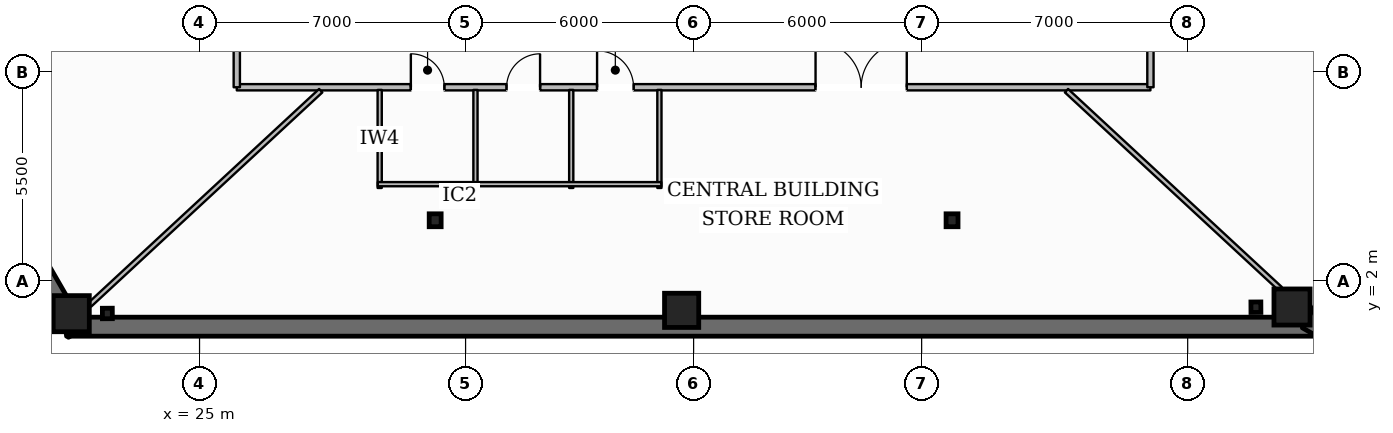
"""IFC4 building model, lengths in metres.
Left out: names, types, materials, properties, quantities, classifications, styles, units other than length and angle.
Written with IfcOpenShell. Run it as: python <this file> out.ifc"""

import sys

from ifc_helpers import new_model, si_unit, direction, frame, frame_2d, origin, origin_2d, place, context, subcontext, project, spatial, rectangle, hollow_rectangle, i_section, extrude, element, fill, save


model = new_model("IFC4")
c1 = context("Model", 3, precision=1e-05, world=origin(), true_north=direction((0.0, 1.0)))
c2 = subcontext(c1, "Body", "Model", "MODEL_VIEW")
j1 = project(units=[si_unit("LENGTHUNIT", "METRE"), si_unit("PLANEANGLEUNIT", "RADIAN")], contexts=[c1])
p1 = place(None, origin())
s1 = spatial("IfcSite", under=j1, at=p1, CompositionType="ELEMENT")
p2 = place(p1, origin())
s2 = spatial("IfcBuilding", under=s1, at=p2, CompositionType="ELEMENT")
p3 = place(p2, frame((0.0, 0.0, -4.2)))
s3 = spatial("IfcBuildingStorey", under=s2, at=p3, CompositionType="ELEMENT", Elevation=-4.2)
p4 = place(p3, frame((13.122, 15.618, 0.0), z_axis=(0.0, 0.0, 1.0), x_axis=(0.499998305863, -0.866026381893, 0.0)))
e1 = element("IfcWall", 1, at=p4, inside=s3, PredefinedType="SHEAR", context=c2, shape_type="SweptSolid", body=[
    extrude(rectangle(XDim=17.289, YDim=0.5, at=frame_2d((8.644, 0.0))), origin(), (0.0, 0.0, 1.0), 3.94),
])
p5 = place(p3, frame((21.5, 0.8, 0.0), z_axis=(0.0, 0.0, 1.0), x_axis=(1.0, 0.0, 0.0)))
e2 = element("IfcWall", 2, at=p5, inside=s3, PredefinedType="SHEAR", context=c2, shape_type="SweptSolid", body=[
    extrude(rectangle(XDim=33.0, YDim=0.5, at=frame_2d((16.5, 0.0))), origin(), (0.0, 0.0, 1.0), 3.94),
])
p6 = place(p3, frame((54.233, 0.646, 0.0), z_axis=(0.0, 0.0, 1.0), x_axis=(0.499998305863, 0.866026381893, 0.0)))
e3 = element("IfcWall", 3, at=p6, inside=s3, PredefinedType="SHEAR", context=c2, shape_type="SweptSolid", body=[
    extrude(rectangle(XDim=17.289, YDim=0.5, at=frame_2d((8.644, 0.0))), origin(), (0.0, 0.0, 1.0), 3.94),
])
for number, where, z_axis, x_axis in (
    (4, (21.625, 1.142, 0.0), (0.0, 0.0, 1.0), (1.0, 0.0, 0.0)),
    (5, (53.746, 1.318, 0.0), (0.0, 0.0, 1.0), (1.0, 0.0, 0.0)),
):
    element("IfcColumn", number, at=place(p3, frame(where, z_axis=z_axis, x_axis=x_axis)), inside=s3, PredefinedType="COLUMN", context=c2, shape_type="SweptSolid", body=[
        extrude(hollow_rectangle(XDim=0.95, YDim=0.95, WallThickness=0.04, at=origin_2d()), origin(), (0.0, 0.0, 1.0), 3.94),
    ])
p7 = place(p3, frame((37.685, 1.23, 0.0), z_axis=(0.0, 0.0, 1.0), x_axis=(1.0, 0.0, 0.0)))
e6 = element("IfcColumn", 6, at=p7, inside=s3, PredefinedType="COLUMN", context=c2, shape_type="SweptSolid", body=[
    extrude(hollow_rectangle(XDim=0.9, YDim=0.9, WallThickness=0.038, at=origin_2d()), origin(), (0.0, 0.0, 1.0), 3.94),
])
for number, where, z_axis, x_axis in (
    (7, (22.574, 1.148, 0.0), (0.0, 0.0, 1.0), (1.0, 0.005, 0.0)),
    (8, (52.795, 1.312, 0.0), (0.0, 0.0, 1.0), (1.0, 0.005, 0.0)),
):
    element("IfcColumn", number, at=place(p3, frame(where, z_axis=z_axis, x_axis=x_axis)), inside=s3, PredefinedType="PILASTER", context=c2, shape_type="SweptSolid", body=[
        extrude(i_section(OverallWidth=0.261, OverallDepth=0.276, WebThickness=0.015, FlangeThickness=0.025, at=origin_2d()), origin(), (0.0, 0.0, 1.0), 3.94),
    ])
for number, where, z_axis, x_axis in (
    (9, (31.2, 3.6, 0.0), (0.0, 0.0, 1.0), (1.0, 0.0, 0.0)),
    (10, (44.8, 3.6, 0.0), (0.0, 0.0, 1.0), (1.0, 0.0, 0.0)),
):
    element("IfcColumn", number, at=place(p3, frame(where, z_axis=z_axis, x_axis=x_axis)), inside=s3, PredefinedType="COLUMN", context=c2, shape_type="SweptSolid", body=[
        extrude(i_section(OverallWidth=0.314, OverallDepth=0.34, WebThickness=0.019, FlangeThickness=0.031, at=origin_2d()), origin(), (0.0, 0.0, 1.0), 3.94),
    ])
p8 = place(p3, frame((25.98, 7.1, 0.0), z_axis=(0.0, 0.0, 1.0), x_axis=(1.0, 0.0, 0.0)))
e11 = element("IfcWall", 11, at=p8, inside=s3, PredefinedType="PARTITIONING", context=c2, shape_type="SweptSolid", body=[
    extrude(rectangle(XDim=24.04, YDim=0.165, at=frame_2d((12.02, 0.0))), origin(), (0.0, 0.0, 1.0), 3.94),
])
p9 = place(p8, frame((4.58, 0.0, 0.0)))
e12 = element("IfcOpeningElement", 12, at=p9, cuts=e11, PredefinedType="OPENING", context=c2, shape_type="SweptSolid", body=[
    extrude(rectangle(XDim=0.88, YDim=2.1, at=frame_2d((0.44, 1.05))), frame((0.0, 0.093, 0.0), z_axis=(0.0, -1.0, 0.0), x_axis=(1.0, 0.0, 0.0)), (0.0, 0.0, 1.0), 0.185),
])
p10 = place(p8, frame((7.1, 0.0, 0.0)))
e13 = element("IfcOpeningElement", 13, at=p10, cuts=e11, PredefinedType="OPENING", context=c2, shape_type="SweptSolid", body=[
    extrude(rectangle(XDim=0.88, YDim=2.1, at=frame_2d((0.44, 1.05))), frame((0.0, 0.093, 0.0), z_axis=(0.0, -1.0, 0.0), x_axis=(1.0, 0.0, 0.0)), (0.0, 0.0, 1.0), 0.185),
])
p11 = place(p8, frame((9.48, 0.0, 0.0)))
e14 = element("IfcOpeningElement", 14, at=p11, cuts=e11, PredefinedType="OPENING", context=c2, shape_type="SweptSolid", body=[
    extrude(rectangle(XDim=0.96, YDim=2.1, at=frame_2d((0.48, 1.05))), frame((0.0, 0.093, 0.0), z_axis=(0.0, -1.0, 0.0), x_axis=(1.0, 0.0, 0.0)), (0.0, 0.0, 1.0), 0.185),
])
p12 = place(p8, frame((15.229, 0.0, 0.0)))
e15 = element("IfcOpeningElement", 15, at=p12, cuts=e11, PredefinedType="OPENING", context=c2, shape_type="SweptSolid", body=[
    extrude(rectangle(XDim=2.4, YDim=2.4, at=frame_2d((1.2, 1.2))), frame((0.0, 0.093, 0.0), z_axis=(0.0, -1.0, 0.0), x_axis=(1.0, 0.0, 0.0)), (0.0, 0.0, 1.0), 0.185),
])
p13 = place(p3, frame((25.98, 7.1, 0.0), z_axis=(0.0, 0.0, 1.0), x_axis=(0.0, 1.0, 0.0)))
e16 = element("IfcWall", 16, at=p13, inside=s3, PredefinedType="PARTITIONING", context=c2, shape_type="SweptSolid", body=[
    extrude(rectangle(XDim=18.0, YDim=0.165, at=frame_2d((9.0, 0.0))), origin(), (0.0, 0.0, 1.0), 3.94),
])
p14 = place(p13, frame((4.505, 0.0, 0.0)))
e17 = element("IfcOpeningElement", 17, at=p14, cuts=e16, PredefinedType="OPENING", context=c2, shape_type="SweptSolid", body=[
    extrude(rectangle(XDim=2.4, YDim=2.4, at=frame_2d((1.2, 1.2))), frame((0.0, 0.093, 0.0), z_axis=(0.0, -1.0, 0.0), x_axis=(1.0, 0.0, 0.0)), (0.0, 0.0, 1.0), 0.185),
])
p15 = place(p3, frame((50.02, 7.1, 0.0), z_axis=(0.0, 0.0, 1.0), x_axis=(0.0, 1.0, 0.0)))
e18 = element("IfcWall", 18, at=p15, inside=s3, PredefinedType="PARTITIONING", context=c2, shape_type="SweptSolid", body=[
    extrude(rectangle(XDim=18.0, YDim=0.165, at=frame_2d((9.0, 0.0))), origin(), (0.0, 0.0, 1.0), 3.628),
])
p16 = place(p15, frame((6.144, 0.0, 0.0)))
e19 = element("IfcOpeningElement", 19, at=p16, cuts=e18, PredefinedType="OPENING", context=c2, shape_type="SweptSolid", body=[
    extrude(rectangle(XDim=2.4, YDim=2.4, at=frame_2d((1.2, 1.2))), frame((0.0, 0.093, 0.0), z_axis=(0.0, -1.0, 0.0), x_axis=(1.0, 0.0, 0.0)), (0.0, 0.0, 1.0), 0.185),
])
for number, where, z_axis, x_axis in (
    (20, (29.74, 4.45, 0.0), (0.0, 0.0, 1.0), (0.0, 1.0, 0.0)),
    (21, (32.26, 4.45, 0.0), (0.0, 0.0, 1.0), (0.0, 1.0, 0.0)),
    (22, (34.78, 4.45, 0.0), (0.0, 0.0, 1.0), (0.0, 1.0, 0.0)),
    (23, (37.1, 4.45, 0.0), (0.0, 0.0, 1.0), (0.0, 1.0, 0.0)),
):
    element("IfcWall", number, at=place(p3, frame(where, z_axis=z_axis, x_axis=x_axis)), inside=s3, PredefinedType="PLUMBINGWALL", context=c2, shape_type="SweptSolid", body=[
        extrude(rectangle(XDim=2.58, YDim=0.11, at=frame_2d((1.29, 0.0))), origin(), (0.0, 0.0, 1.0), 3.94),
    ])
p17 = place(p3, frame((29.69, 4.55, 0.0), z_axis=(0.0, 0.0, 1.0), x_axis=(1.0, 0.0, 0.0)))
e24 = element("IfcWall", 24, at=p17, inside=s3, PredefinedType="PLUMBINGWALL", context=c2, shape_type="SweptSolid", body=[
    extrude(rectangle(XDim=7.46, YDim=0.11, at=frame_2d((3.73, 0.0))), origin(), (0.0, 0.0, 1.0), 3.628),
])
p18 = place(p3, frame((28.189, 7.01, 0.0), z_axis=(0.0, 0.0, 1.0), x_axis=(-0.733538790589, -0.679647587137, 0.0)))
e25 = element("IfcWall", 25, at=p18, inside=s3, PredefinedType="PARTITIONING", context=c2, shape_type="SweptSolid", body=[
    extrude(rectangle(XDim=8.29, YDim=0.125, at=frame_2d((4.145, 0.0))), origin(), (0.0, 0.0, 1.0), 3.94),
])
p19 = place(p3, frame((47.811, 7.01, 0.0), z_axis=(0.0, 0.0, 1.0), x_axis=(0.733527128647, -0.679660173571, 0.0)))
e26 = element("IfcWall", 26, at=p19, inside=s3, PredefinedType="PARTITIONING", context=c2, shape_type="SweptSolid", body=[
    extrude(rectangle(XDim=7.664, YDim=0.125, at=frame_2d((3.832, 0.0))), origin(), (0.0, 0.0, 1.0), 3.407),
])
p20 = place(p9, origin())
e27 = element("IfcDoor", 27, at=p20, inside=s3, OperationType="SINGLE_SWING_LEFT", PredefinedType="DOOR", context=c2, shape_type="SweptSolid", body=[
    extrude(rectangle(XDim=0.88, YDim=2.1, at=frame_2d((0.44, 1.05))), frame((0.0, 0.025, 0.0), z_axis=(0.0, -1.0, 0.0), x_axis=(1.0, 0.0, 0.0)), (0.0, 0.0, 1.0), 0.05),
])
fill(e12, e27)
p21 = place(p10, origin())
e28 = element("IfcDoor", 28, at=p21, inside=s3, OperationType="SINGLE_SWING_RIGHT", PredefinedType="DOOR", context=c2, shape_type="SweptSolid", body=[
    extrude(rectangle(XDim=0.88, YDim=2.1, at=frame_2d((0.44, 1.05))), frame((0.0, 0.025, 0.0), z_axis=(0.0, -1.0, 0.0), x_axis=(1.0, 0.0, 0.0)), (0.0, 0.0, 1.0), 0.05),
])
fill(e13, e28)
p22 = place(p11, origin())
e29 = element("IfcDoor", 29, at=p22, inside=s3, OperationType="SINGLE_SWING_LEFT", PredefinedType="DOOR", context=c2, shape_type="SweptSolid", body=[
    extrude(rectangle(XDim=0.96, YDim=2.1, at=frame_2d((0.48, 1.05))), frame((0.0, 0.025, 0.0), z_axis=(0.0, -1.0, 0.0), x_axis=(1.0, 0.0, 0.0)), (0.0, 0.0, 1.0), 0.05),
])
fill(e14, e29)
p23 = place(p12, origin())
e30 = element("IfcDoor", 30, at=p23, inside=s3, OperationType="DOUBLE_DOOR_SINGLE_SWING", PredefinedType="GATE", context=c2, shape_type="SweptSolid", body=[
    extrude(rectangle(XDim=2.4, YDim=2.4, at=frame_2d((1.2, 1.2))), frame((0.0, 0.025, 0.0), z_axis=(0.0, -1.0, 0.0), x_axis=(1.0, 0.0, 0.0)), (0.0, 0.0, 1.0), 0.05),
])
fill(e15, e30)
save(model, sys.argv[1])
